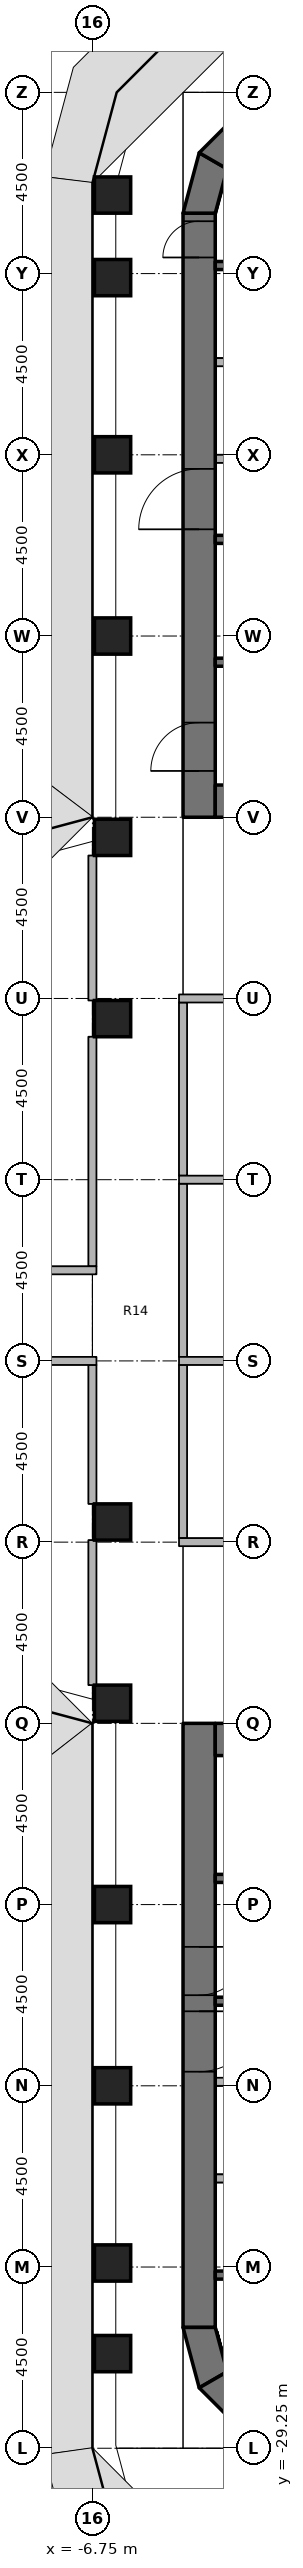
"""IFC4 building model, lengths in metres.
Left out: names, types, materials, properties, quantities, classifications, styles, units other than length and angle.
Written with IfcOpenShell. Run it as: python <this file> out.ifc"""

import sys

from ifc_helpers import new_model, si_unit, direction, frame, frame_2d, origin, origin_2d, place, context, subcontext, project, spatial, polyline, rectangle, outline, extrude, element, fill, save


model = new_model("IFC4")
c1 = context("Model", 3, precision=1e-05, world=origin(), true_north=direction((0.0, 1.0)))
c2 = subcontext(c1, "Body", "Model", "MODEL_VIEW")
j1 = project(units=[si_unit("LENGTHUNIT", "METRE"), si_unit("PLANEANGLEUNIT", "RADIAN")], contexts=[c1])
p1 = place(None, origin())
s1 = spatial("IfcSite", under=j1, at=p1, CompositionType="ELEMENT")
p2 = place(p1, origin())
s2 = spatial("IfcBuilding", under=s1, at=p2, CompositionType="ELEMENT")
p3 = place(p2, frame((0.0, 0.0, 124.6)))
s3 = spatial("IfcBuildingStorey", under=s2, at=p3, CompositionType="ELEMENT", Elevation=124.6)
for number, where, z_axis, x_axis in (
    (1, (-6.25, -26.9, 0.0), (0.0, 0.0, 1.0), (1.0, 0.0, 0.0)),
    (2, (-6.25, -24.65, 0.0), (0.0, 0.0, 1.0), (1.0, 0.0, 0.0)),
    (3, (-6.25, -20.25, 0.0), (0.0, 0.0, 1.0), (1.0, 0.0, 0.0)),
    (4, (-6.25, -15.75, 0.0), (0.0, 0.0, 1.0), (1.0, 0.0, 0.0)),
    (5, (-6.25, -10.75, 0.0), (0.0, 0.0, 1.0), (1.0, 0.0, 0.0)),
    (6, (-6.25, -6.25, 0.0), (0.0, 0.0, 1.0), (1.0, 0.0, 0.0)),
    (7, (-6.25, 6.25, 0.0), (0.0, 0.0, 1.0), (1.0, 0.0, 0.0)),
    (8, (-6.25, 10.75, 0.0), (0.0, 0.0, 1.0), (1.0, 0.0, 0.0)),
    (9, (-6.25, 15.75, 0.0), (0.0, 0.0, 1.0), (1.0, 0.0, 0.0)),
    (10, (-6.25, 20.25, 0.0), (0.0, 0.0, 1.0), (1.0, 0.0, 0.0)),
    (11, (-6.25, 24.65, 0.0), (0.0, 0.0, 1.0), (1.0, 0.0, 0.0)),
    (12, (-6.25, 26.7, 0.0), (0.0, 0.0, 1.0), (1.0, 0.0, 0.0)),
):
    element("IfcColumn", number, at=place(p3, frame(where, z_axis=z_axis, x_axis=x_axis)), inside=s3, PredefinedType="COLUMN", context=c2, shape_type="SweptSolid", body=[
        extrude(rectangle(XDim=0.9, YDim=0.9, at=origin_2d()), origin(), (0.0, 0.0, 1.0), 3.65),
    ])
p4 = place(p3, frame((-4.1, 11.25, 0.0), z_axis=(0.0, 0.0, 1.0), x_axis=(0.0, 1.0, 0.0)))
e13 = element("IfcWall", 13, at=p4, inside=s3, PredefinedType="SHEAR", context=c2, shape_type="SweptSolid", body=[
    extrude(rectangle(XDim=15.0, YDim=0.8, at=frame_2d((7.5, 0.0))), origin(), (0.0, 0.0, 1.0), 3.8),
])
p5 = place(p4, frame((7.15, 0.0, 0.0)))
e14 = element("IfcOpeningElement", 14, at=p5, cuts=e13, PredefinedType="OPENING", context=c2, shape_type="SweptSolid", body=[
    extrude(rectangle(XDim=1.5, YDim=2.3, at=frame_2d((0.75, 1.15))), frame((0.0, 0.41, 0.0), z_axis=(0.0, -1.0, 0.0), x_axis=(1.0, 0.0, 0.0)), (0.0, 0.0, 1.0), 0.82),
])
p6 = place(p4, frame((13.9, 0.0, 0.0)))
e15 = element("IfcOpeningElement", 15, at=p6, cuts=e13, PredefinedType="OPENING", context=c2, shape_type="SweptSolid", body=[
    extrude(rectangle(XDim=0.9, YDim=2.1, at=frame_2d((0.45, 1.05))), frame((0.0, 0.41, 0.0), z_axis=(0.0, -1.0, 0.0), x_axis=(1.0, 0.0, 0.0)), (0.0, 0.0, 1.0), 0.82),
])
p7 = place(p4, frame((1.15, 0.0, 0.0)))
e16 = element("IfcOpeningElement", 16, at=p7, cuts=e13, PredefinedType="OPENING", context=c2, shape_type="SweptSolid", body=[
    extrude(rectangle(XDim=1.2, YDim=2.1, at=frame_2d((0.6, 1.05))), frame((0.0, 0.41, 0.0), z_axis=(0.0, -1.0, 0.0), x_axis=(1.0, 0.0, 0.0)), (0.0, 0.0, 1.0), 0.82),
])
p8 = place(p3, frame((-3.7, 11.65, 0.0), z_axis=(0.0, 0.0, 1.0), x_axis=(1.0, 0.0, 0.0)))
e17 = element("IfcWall", 17, at=p8, inside=s3, PredefinedType="SHEAR", context=c2, shape_type="SweptSolid", body=[
    extrude(rectangle(XDim=7.4, YDim=0.8, at=frame_2d((3.7, 0.0))), origin(), (0.0, 0.0, 1.0), 3.8),
])
p9 = place(p3, origin())
e18 = element("IfcWall", 18, at=p9, inside=s3, PredefinedType="SHEAR", context=c2, shape_type="SweptSolid", body=[
    extrude(outline(polyline([(-4.5, 26.25), (-4.098, 27.75), (-3.405, 27.35), (-3.7, 26.25), (-4.5, 26.25)])), origin(), (0.0, 0.0, 1.0), 3.8),
])
p10 = place(p3, origin())
e19 = element("IfcWall", 19, at=p10, inside=s3, PredefinedType="SHEAR", context=c2, shape_type="SweptSolid", body=[
    extrude(outline(polyline([(-4.098, 27.75), (-3.0, 28.848), (-2.6, 28.155), (-3.405, 27.35), (-4.098, 27.75)])), origin(), (0.0, 0.0, 1.0), 3.8),
])
p11 = place(p3, frame((-4.1, -11.25, 0.0), z_axis=(0.0, 0.0, 1.0), x_axis=(0.0, -1.0, 0.0)))
e20 = element("IfcWall", 20, at=p11, inside=s3, PredefinedType="SHEAR", context=c2, shape_type="SweptSolid", body=[
    extrude(rectangle(XDim=15.0, YDim=0.8, at=frame_2d((7.5, 0.0))), origin(), (0.0, 0.0, 1.0), 3.8),
])
p12 = place(p11, frame((7.15, 0.0, 0.0)))
e21 = element("IfcOpeningElement", 21, at=p12, cuts=e20, PredefinedType="OPENING", context=c2, shape_type="SweptSolid", body=[
    extrude(rectangle(XDim=1.5, YDim=2.3, at=frame_2d((0.75, 1.15))), frame((0.0, 0.41, 0.0), z_axis=(0.0, -1.0, 0.0), x_axis=(1.0, 0.0, 0.0)), (0.0, 0.0, 1.0), 0.82),
])
p13 = place(p11, frame((5.55, 0.0, 0.0)))
e22 = element("IfcOpeningElement", 22, at=p13, cuts=e20, PredefinedType="OPENING", context=c2, shape_type="SweptSolid", body=[
    extrude(rectangle(XDim=1.2, YDim=2.1, at=frame_2d((0.6, 1.05))), frame((0.0, 0.41, 0.0), z_axis=(0.0, -1.0, 0.0), x_axis=(1.0, 0.0, 0.0)), (0.0, 0.0, 1.0), 0.82),
])
p14 = place(p3, frame((-3.7, -11.65, 0.0), z_axis=(0.0, 0.0, 1.0), x_axis=(1.0, 0.0, 0.0)))
e23 = element("IfcWall", 23, at=p14, inside=s3, PredefinedType="SHEAR", context=c2, shape_type="SweptSolid", body=[
    extrude(rectangle(XDim=7.4, YDim=0.8, at=frame_2d((3.7, 0.0))), origin(), (0.0, 0.0, 1.0), 3.8),
])
p15 = place(p3, origin())
e24 = element("IfcWall", 24, at=p15, inside=s3, PredefinedType="SHEAR", context=c2, shape_type="SweptSolid", body=[
    extrude(outline(polyline([(-4.5, -26.25), (-4.098, -27.75), (-3.405, -27.35), (-3.7, -26.25), (-4.5, -26.25)])), origin(), (0.0, 0.0, 1.0), 3.8),
])
p16 = place(p3, origin())
e25 = element("IfcWall", 25, at=p16, inside=s3, PredefinedType="SHEAR", context=c2, shape_type="SweptSolid", body=[
    extrude(outline(polyline([(-4.098, -27.75), (-3.0, -28.848), (-2.6, -28.155), (-3.405, -27.35), (-4.098, -27.75)])), origin(), (0.0, 0.0, 1.0), 3.8),
])
for number, where, z_axis, x_axis in (
    (26, (-3.7, 24.95, 0.0), (0.0, 0.0, 1.0), (1.0, 0.0, 0.0)),
    (27, (-3.7, 18.15, 0.0), (0.0, 0.0, 1.0), (1.0, 0.0, 0.0)),
    (28, (-3.7, 15.1, 0.0), (0.0, 0.0, 1.0), (1.0, 0.0, 0.0)),
):
    element("IfcWall", number, at=place(p3, frame(where, z_axis=z_axis, x_axis=x_axis)), inside=s3, PredefinedType="SHEAR", context=c2, shape_type="SweptSolid", body=[
        extrude(rectangle(XDim=7.4, YDim=0.2, at=frame_2d((3.7, 0.0))), origin(), (0.0, 0.0, 1.0), 3.65),
    ])
p17 = place(p3, frame((-3.7, 20.15, 0.0), z_axis=(0.0, 0.0, 1.0), x_axis=(1.0, 0.0, 0.0)))
e29 = element("IfcWall", 29, at=p17, inside=s3, PredefinedType="PARTITIONING", context=c2, shape_type="SweptSolid", body=[
    extrude(rectangle(XDim=2.8, YDim=0.2, at=frame_2d((1.4, 0.0))), origin(), (0.0, 0.0, 1.0), 3.65),
])
p18 = place(p3, frame((-3.7, 22.55, 0.0), z_axis=(0.0, 0.0, 1.0), x_axis=(1.0, 0.0, 0.0)))
e30 = element("IfcWall", 30, at=p18, inside=s3, PredefinedType="PARTITIONING", context=c2, shape_type="SweptSolid", body=[
    extrude(rectangle(XDim=2.6, YDim=0.2, at=frame_2d((1.3, 0.0))), origin(), (0.0, 0.0, 1.0), 3.65),
])
for number, where, z_axis, x_axis in (
    (31, (3.7, -24.95, 0.0), (0.0, 0.0, 1.0), (-1.0, 0.0, 0.0)),
    (32, (3.7, -18.15, 0.0), (0.0, 0.0, 1.0), (-1.0, 0.0, 0.0)),
    (33, (3.7, -15.1, 0.0), (0.0, 0.0, 1.0), (-1.0, 0.0, 0.0)),
):
    element("IfcWall", number, at=place(p3, frame(where, z_axis=z_axis, x_axis=x_axis)), inside=s3, PredefinedType="SHEAR", context=c2, shape_type="SweptSolid", body=[
        extrude(rectangle(XDim=7.4, YDim=0.2, at=frame_2d((3.7, 0.0))), origin(), (0.0, 0.0, 1.0), 3.65),
    ])
p19 = place(p3, frame((-0.9, -20.15, 0.0), z_axis=(0.0, 0.0, 1.0), x_axis=(-1.0, 0.0, 0.0)))
e34 = element("IfcWall", 34, at=p19, inside=s3, PredefinedType="PARTITIONING", context=c2, shape_type="SweptSolid", body=[
    extrude(rectangle(XDim=2.8, YDim=0.2, at=frame_2d((1.4, 0.0))), origin(), (0.0, 0.0, 1.0), 3.65),
])
p20 = place(p3, frame((-1.1, -22.55, 0.0), z_axis=(0.0, 0.0, 1.0), x_axis=(-1.0, 0.0, 0.0)))
e35 = element("IfcWall", 35, at=p20, inside=s3, PredefinedType="PARTITIONING", context=c2, shape_type="SweptSolid", body=[
    extrude(rectangle(XDim=2.6, YDim=0.2, at=frame_2d((1.3, 0.0))), origin(), (0.0, 0.0, 1.0), 3.65),
])
for number, where, z_axis, x_axis in (
    (36, (-4.5, 2.35, 0.0), (0.0, 0.0, 1.0), (0.0, 1.0, 0.0)),
    (37, (-4.5, -2.15, 0.0), (0.0, 0.0, 1.0), (0.0, 1.0, 0.0)),
    (38, (-4.5, -6.65, 0.0), (0.0, 0.0, 1.0), (0.0, 1.0, 0.0)),
):
    element("IfcWall", number, at=place(p3, frame(where, z_axis=z_axis, x_axis=x_axis)), inside=s3, PredefinedType="PARTITIONING", context=c2, shape_type="SweptSolid", body=[
        extrude(rectangle(XDim=4.3, YDim=0.2, at=frame_2d((2.15, 0.0))), origin(), (0.0, 0.0, 1.0), 2.738),
    ])
p21 = place(p3, frame((-6.75, 0.1, 0.0), z_axis=(0.0, 0.0, 1.0), x_axis=(0.0, 1.0, 0.0)))
e39 = element("IfcWall", 39, at=p21, inside=s3, PredefinedType="PARTITIONING", context=c2, shape_type="SweptSolid", body=[
    extrude(rectangle(XDim=5.7, YDim=0.2, at=frame_2d((2.85, 0.0))), origin(), (0.0, 0.0, 1.0), 2.738),
])
for number, where, z_axis, x_axis in (
    (40, (-6.75, 6.7, 0.0), (0.0, 0.0, 1.0), (0.0, 1.0, 0.0)),
    (41, (-6.75, -10.3, 0.0), (0.0, 0.0, 1.0), (0.0, 1.0, 0.0)),
):
    element("IfcWall", number, at=place(p3, frame(where, z_axis=z_axis, x_axis=x_axis)), inside=s3, PredefinedType="PARTITIONING", context=c2, shape_type="SweptSolid", body=[
        extrude(rectangle(XDim=3.6, YDim=0.2, at=frame_2d((1.8, 0.0))), origin(), (0.0, 0.0, 1.0), 2.738),
    ])
p22 = place(p3, frame((-6.75, -5.8, 0.0), z_axis=(0.0, 0.0, 1.0), x_axis=(0.0, 1.0, 0.0)))
e42 = element("IfcWall", 42, at=p22, inside=s3, PredefinedType="PARTITIONING", context=c2, shape_type="SweptSolid", body=[
    extrude(rectangle(XDim=3.45, YDim=0.2, at=frame_2d((1.725, 0.0))), origin(), (0.0, 0.0, 1.0), 2.738),
])
p23 = place(p3, frame((4.6, 6.75, 0.0), z_axis=(0.0, 0.0, 1.0), x_axis=(-1.0, 0.0, 0.0)))
e43 = element("IfcWall", 43, at=p23, inside=s3, PredefinedType="PARTITIONING", context=c2, shape_type="SweptSolid", body=[
    extrude(rectangle(XDim=9.2, YDim=0.2, at=frame_2d((4.6, 0.0))), origin(), (0.0, 0.0, 1.0), 2.738),
])
p24 = place(p23, frame((4.1, 0.0, 0.0)))
e44 = element("IfcOpeningElement", 44, at=p24, cuts=e43, PredefinedType="OPENING", context=c2, shape_type="SweptSolid", body=[
    extrude(rectangle(XDim=1.0, YDim=2.1, at=frame_2d((0.5, 1.05))), frame((0.0, 0.11, 0.0), z_axis=(0.0, -1.0, 0.0), x_axis=(1.0, 0.0, 0.0)), (0.0, 0.0, 1.0), 0.22),
])
p25 = place(p3, frame((-4.6, -6.75, 0.0), z_axis=(0.0, 0.0, 1.0), x_axis=(1.0, 0.0, 0.0)))
e45 = element("IfcWall", 45, at=p25, inside=s3, PredefinedType="PARTITIONING", context=c2, shape_type="SweptSolid", body=[
    extrude(rectangle(XDim=9.2, YDim=0.2, at=frame_2d((4.6, 0.0))), origin(), (0.0, 0.0, 1.0), 2.738),
])
p26 = place(p25, frame((4.1, 0.0, 0.0)))
e46 = element("IfcOpeningElement", 46, at=p26, cuts=e45, PredefinedType="OPENING", context=c2, shape_type="SweptSolid", body=[
    extrude(rectangle(XDim=1.0, YDim=2.1, at=frame_2d((0.5, 1.05))), frame((0.0, 0.11, 0.0), z_axis=(0.0, -1.0, 0.0), x_axis=(1.0, 0.0, 0.0)), (0.0, 0.0, 1.0), 0.22),
])
for number, where, z_axis, x_axis in (
    (47, (-4.6, 2.25, 0.0), (0.0, 0.0, 1.0), (1.0, 0.0, 0.0)),
    (48, (-4.6, -2.25, 0.0), (0.0, 0.0, 1.0), (1.0, 0.0, 0.0)),
):
    element("IfcWall", number, at=place(p3, frame(where, z_axis=z_axis, x_axis=x_axis)), inside=s3, PredefinedType="PARTITIONING", context=c2, shape_type="SweptSolid", body=[
        extrude(rectangle(XDim=9.2, YDim=0.2, at=frame_2d((4.6, 0.0))), origin(), (0.0, 0.0, 1.0), 2.738),
    ])
p27 = place(p3, frame((-11.35, 0.0, 0.0), z_axis=(0.0, 0.0, 1.0), x_axis=(1.0, 0.0, 0.0)))
e49 = element("IfcWall", 49, at=p27, inside=s3, PredefinedType="PARTITIONING", context=c2, shape_type="SweptSolid", body=[
    extrude(rectangle(XDim=4.7, YDim=0.2, at=frame_2d((2.35, 0.0))), origin(), (0.0, 0.0, 1.0), 2.738),
])
p28 = place(p27, frame((1.85, 0.0, 0.0)))
e50 = element("IfcOpeningElement", 50, at=p28, cuts=e49, PredefinedType="OPENING", context=c2, shape_type="SweptSolid", body=[
    extrude(rectangle(XDim=1.0, YDim=2.1, at=frame_2d((0.5, 1.05))), frame((0.0, 0.11, 0.0), z_axis=(0.0, -1.0, 0.0), x_axis=(1.0, 0.0, 0.0)), (0.0, 0.0, 1.0), 0.22),
])
p29 = place(p3, frame((-6.65, -2.25, 0.0), z_axis=(0.0, 0.0, 1.0), x_axis=(-1.0, 0.0, 0.0)))
e51 = element("IfcWall", 51, at=p29, inside=s3, PredefinedType="PARTITIONING", context=c2, shape_type="SweptSolid", body=[
    extrude(rectangle(XDim=4.7, YDim=0.2, at=frame_2d((2.35, 0.0))), origin(), (0.0, 0.0, 1.0), 2.738),
])
p30 = place(p29, frame((1.85, 0.0, 0.0)))
e52 = element("IfcOpeningElement", 52, at=p30, cuts=e51, PredefinedType="OPENING", context=c2, shape_type="SweptSolid", body=[
    extrude(rectangle(XDim=1.0, YDim=2.1, at=frame_2d((0.5, 1.05))), frame((0.0, 0.11, 0.0), z_axis=(0.0, -1.0, 0.0), x_axis=(1.0, 0.0, 0.0)), (0.0, 0.0, 1.0), 0.22),
])
p31 = place(p5, origin())
e53 = element("IfcDoor", 53, at=p31, inside=s3, OperationType="DOUBLE_DOOR_SINGLE_SWING", PredefinedType="DOOR", context=c2, shape_type="SweptSolid", body=[
    extrude(rectangle(XDim=1.5, YDim=2.3, at=frame_2d((0.75, 1.15))), frame((0.0, 0.025, 0.0), z_axis=(0.0, -1.0, 0.0), x_axis=(1.0, 0.0, 0.0)), (0.0, 0.0, 1.0), 0.05),
])
fill(e14, e53)
p32 = place(p6, origin())
e54 = element("IfcDoor", 54, at=p32, inside=s3, OperationType="SINGLE_SWING_RIGHT", PredefinedType="DOOR", context=c2, shape_type="SweptSolid", body=[
    extrude(rectangle(XDim=0.9, YDim=2.1, at=frame_2d((0.45, 1.05))), frame((0.0, 0.025, 0.0), z_axis=(0.0, -1.0, 0.0), x_axis=(1.0, 0.0, 0.0)), (0.0, 0.0, 1.0), 0.05),
])
fill(e15, e54)
p33 = place(p7, origin())
e55 = element("IfcDoor", 55, at=p33, inside=s3, OperationType="SINGLE_SWING_LEFT", PredefinedType="DOOR", context=c2, shape_type="SweptSolid", body=[
    extrude(rectangle(XDim=1.2, YDim=2.1, at=frame_2d((0.6, 1.05))), frame((0.0, 0.025, 0.0), z_axis=(0.0, -1.0, 0.0), x_axis=(1.0, 0.0, 0.0)), (0.0, 0.0, 1.0), 0.05),
])
fill(e16, e55)
p34 = place(p12, origin())
e56 = element("IfcDoor", 56, at=p34, inside=s3, OperationType="DOUBLE_DOOR_SINGLE_SWING", PredefinedType="DOOR", context=c2, shape_type="SweptSolid", body=[
    extrude(rectangle(XDim=1.5, YDim=2.3, at=frame_2d((0.75, 1.15))), frame((0.0, 0.025, 0.0), z_axis=(0.0, -1.0, 0.0), x_axis=(1.0, 0.0, 0.0)), (0.0, 0.0, 1.0), 0.05),
])
fill(e21, e56)
p35 = place(p13, origin())
e57 = element("IfcDoor", 57, at=p35, inside=s3, OperationType="SINGLE_SWING_LEFT", PredefinedType="DOOR", context=c2, shape_type="SweptSolid", body=[
    extrude(rectangle(XDim=1.2, YDim=2.1, at=frame_2d((0.6, 1.05))), frame((0.0, 0.025, 0.0), z_axis=(0.0, -1.0, 0.0), x_axis=(1.0, 0.0, 0.0)), (0.0, 0.0, 1.0), 0.05),
])
fill(e22, e57)
save(model, sys.argv[1])
